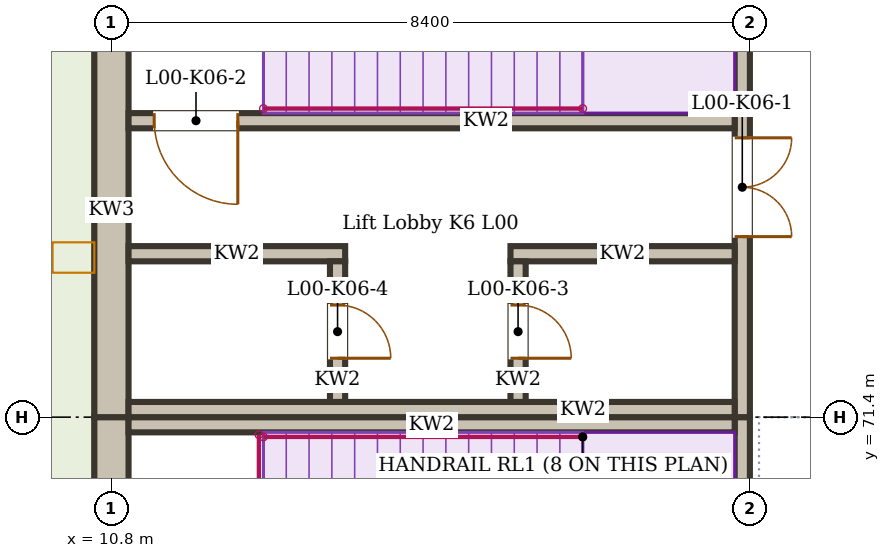
"""IFC4 building model, lengths in metres.
Left out: names, types, materials, properties, quantities, classifications, styles, units other than length and angle.
Written with IfcOpenShell. Run it as: python <this file> out.ifc"""

import sys

from ifc_helpers import new_model, si_unit, direction, frame, frame_2d, origin, place, context, subcontext, project, spatial, rectangle, extrude, element, fill, save


model = new_model("IFC4")
c1 = context("Model", 3, precision=1e-05, world=origin(), true_north=direction((0.0, 1.0)))
c2 = subcontext(c1, "Body", "Model", "MODEL_VIEW")
j1 = project(units=[si_unit("LENGTHUNIT", "METRE"), si_unit("PLANEANGLEUNIT", "RADIAN")], contexts=[c1])
p1 = place(None, origin())
s1 = spatial("IfcSite", under=j1, at=p1, CompositionType="ELEMENT")
p2 = place(p1, origin())
s2 = spatial("IfcBuilding", under=s1, at=p2, CompositionType="ELEMENT")
p3 = place(p2, origin())
s3 = spatial("IfcBuildingStorey", under=s2, at=p3, CompositionType="ELEMENT", Elevation=0.0)
p4 = place(p3, frame((19.1, 71.4, 0.0), z_axis=(0.0, 0.0, 1.0), x_axis=(0.0, -1.0, 0.0)))
e1 = element("IfcWall", 1, at=p4, inside=s3, PredefinedType="SOLIDWALL", context=c2, shape_type="SweptSolid", body=[
    extrude(rectangle(XDim=8.4, YDim=0.2, at=frame_2d((4.2, 0.0))), origin(), (0.0, 0.0, 1.0), 4.5),
])
p5 = place(p4, frame((4.725, 0.0, 0.0)))
e2 = element("IfcOpeningElement", 2, at=p5, cuts=e1, PredefinedType="OPENING", context=c2, shape_type="SweptSolid", body=[
    extrude(rectangle(XDim=1.3, YDim=2.1, at=frame_2d((0.65, 1.05))), frame((0.0, 0.11, 0.0), z_axis=(0.0, -1.0, 0.0), x_axis=(1.0, 0.0, 0.0)), (0.0, 0.0, 1.0), 0.22),
])
p6 = place(p3, frame((10.8, 71.4, 0.0), z_axis=(0.0, 0.0, 1.0), x_axis=(0.0, -1.0, 0.0)))
e3 = element("IfcWall", 3, at=p6, inside=s3, PredefinedType="SOLIDWALL", context=c2, shape_type="SweptSolid", body=[
    extrude(rectangle(XDim=8.4, YDim=0.45, at=frame_2d((4.2, 0.0))), origin(), (0.0, 0.0, 1.0), 4.5),
])
p7 = place(p6, frame((1.65, 0.0, 0.0)))
e4 = element("IfcOpeningElement", 4, at=p7, cuts=e3, PredefinedType="OPENING", context=c2, shape_type="SweptSolid", body=[
    extrude(rectangle(XDim=1.3, YDim=2.1, at=frame_2d((0.65, 1.05))), frame((0.0, 0.235, 0.0), z_axis=(0.0, -1.0, 0.0), x_axis=(1.0, 0.0, 0.0)), (0.0, 0.0, 1.0), 0.47),
])
p8 = place(p3, frame((19.0, 71.3, 0.0), z_axis=(0.0, 0.0, 1.0), x_axis=(-1.0, 0.0, 0.0)))
e5 = element("IfcWall", 5, at=p8, inside=s3, PredefinedType="SOLIDWALL", context=c2, shape_type="SweptSolid", body=[
    extrude(rectangle(XDim=7.975, YDim=0.2, at=frame_2d((3.988, 0.0))), origin(), (0.0, 0.0, 1.0), 4.5),
])
p9 = place(p3, frame((19.1, 79.8, 0.0), z_axis=(0.0, 0.0, 1.0), x_axis=(0.0, -1.0, 0.0)))
e6 = element("IfcWall", 6, at=p9, inside=s3, PredefinedType="SOLIDWALL", context=c2, shape_type="SweptSolid", body=[
    extrude(rectangle(XDim=8.4, YDim=0.2, at=frame_2d((4.2, 0.0))), origin(), (0.0, 0.0, 1.0), 4.5),
])
p10 = place(p9, frame((4.725, 0.0, 0.0)))
e7 = element("IfcOpeningElement", 7, at=p10, cuts=e6, PredefinedType="OPENING", context=c2, shape_type="SweptSolid", body=[
    extrude(rectangle(XDim=1.3, YDim=2.1, at=frame_2d((0.65, 1.05))), frame((0.0, 0.11, 0.0), z_axis=(0.0, -1.0, 0.0), x_axis=(1.0, 0.0, 0.0)), (0.0, 0.0, 1.0), 0.22),
])
p11 = place(p3, frame((10.8, 79.8, 0.0), z_axis=(0.0, 0.0, 1.0), x_axis=(0.0, -1.0, 0.0)))
e8 = element("IfcWall", 8, at=p11, inside=s3, PredefinedType="SOLIDWALL", context=c2, shape_type="SweptSolid", body=[
    extrude(rectangle(XDim=8.4, YDim=0.45, at=frame_2d((4.2, 0.0))), origin(), (0.0, 0.0, 1.0), 4.5),
])
p12 = place(p11, frame((1.65, 0.0, 0.0)))
e9 = element("IfcOpeningElement", 9, at=p12, cuts=e8, PredefinedType="OPENING", context=c2, shape_type="SweptSolid", body=[
    extrude(rectangle(XDim=1.3, YDim=2.1, at=frame_2d((0.65, 1.05))), frame((0.0, 0.235, 0.0), z_axis=(0.0, -1.0, 0.0), x_axis=(1.0, 0.0, 0.0)), (0.0, 0.0, 1.0), 0.47),
])
p13 = place(p3, frame((19.0, 71.5, 0.0), z_axis=(0.0, 0.0, 1.0), x_axis=(-1.0, 0.0, 0.0)))
e10 = element("IfcWall", 10, at=p13, inside=s3, PredefinedType="SOLIDWALL", context=c2, shape_type="SweptSolid", body=[
    extrude(rectangle(XDim=7.975, YDim=0.2, at=frame_2d((3.988, 0.0))), origin(), (0.0, 0.0, 1.0), 4.5),
])
p14 = place(p3, frame((19.0, 75.3, 0.0), z_axis=(0.0, 0.0, 1.0), x_axis=(-1.0, 0.0, 0.0)))
e11 = element("IfcWall", 11, at=p14, inside=s3, PredefinedType="SOLIDWALL", context=c2, shape_type="SweptSolid", body=[
    extrude(rectangle(XDim=7.975, YDim=0.2, at=frame_2d((3.988, 0.0))), origin(), (0.0, 0.0, 1.0), 4.5),
])
p15 = place(p14, frame((6.538, 0.0, 0.0)))
e12 = element("IfcOpeningElement", 12, at=p15, cuts=e11, PredefinedType="OPENING", context=c2, shape_type="SweptSolid", body=[
    extrude(rectangle(XDim=1.1, YDim=2.1, at=frame_2d((0.55, 1.05))), frame((0.0, 0.11, 0.0), z_axis=(0.0, -1.0, 0.0), x_axis=(1.0, 0.0, 0.0)), (0.0, 0.0, 1.0), 0.22),
])
p16 = place(p3, frame((19.0, 73.55, 0.0), z_axis=(0.0, 0.0, 1.0), x_axis=(-1.0, 0.0, 0.0)))
e13 = element("IfcWall", 13, at=p16, inside=s3, PredefinedType="SOLIDWALL", context=c2, shape_type="SweptSolid", body=[
    extrude(rectangle(XDim=2.95, YDim=0.2, at=frame_2d((1.475, 0.0))), origin(), (0.0, 0.0, 1.0), 4.35),
])
p17 = place(p3, frame((13.875, 73.55, 0.0), z_axis=(0.0, 0.0, 1.0), x_axis=(-1.0, 0.0, 0.0)))
e14 = element("IfcWall", 14, at=p17, inside=s3, PredefinedType="SOLIDWALL", context=c2, shape_type="SweptSolid", body=[
    extrude(rectangle(XDim=2.85, YDim=0.2, at=frame_2d((1.425, 0.0))), origin(), (0.0, 0.0, 1.0), 4.35),
])
p18 = place(p3, frame((16.15, 73.45, 0.0), z_axis=(0.0, 0.0, 1.0), x_axis=(0.0, -1.0, 0.0)))
e15 = element("IfcWall", 15, at=p18, inside=s3, PredefinedType="SOLIDWALL", context=c2, shape_type="SweptSolid", body=[
    extrude(rectangle(XDim=1.85, YDim=0.2, at=frame_2d((0.925, 0.0))), origin(), (0.0, 0.0, 1.0), 4.35),
])
p19 = place(p18, frame((0.575, 0.0, 0.0)))
e16 = element("IfcOpeningElement", 16, at=p19, cuts=e15, PredefinedType="OPENING", context=c2, shape_type="SweptSolid", body=[
    extrude(rectangle(XDim=0.7, YDim=2.1, at=frame_2d((0.35, 1.05))), frame((0.0, 0.11, 0.0), z_axis=(0.0, -1.0, 0.0), x_axis=(1.0, 0.0, 0.0)), (0.0, 0.0, 1.0), 0.22),
])
p20 = place(p3, frame((13.775, 73.45, 0.0), z_axis=(0.0, 0.0, 1.0), x_axis=(0.0, -1.0, 0.0)))
e17 = element("IfcWall", 17, at=p20, inside=s3, PredefinedType="SOLIDWALL", context=c2, shape_type="SweptSolid", body=[
    extrude(rectangle(XDim=1.85, YDim=0.2, at=frame_2d((0.925, 0.0))), origin(), (0.0, 0.0, 1.0), 4.35),
])
p21 = place(p20, frame((0.575, 0.0, 0.0)))
e18 = element("IfcOpeningElement", 18, at=p21, cuts=e17, PredefinedType="OPENING", context=c2, shape_type="SweptSolid", body=[
    extrude(rectangle(XDim=0.7, YDim=2.1, at=frame_2d((0.35, 1.05))), frame((0.0, 0.11, 0.0), z_axis=(0.0, -1.0, 0.0), x_axis=(1.0, 0.0, 0.0)), (0.0, 0.0, 1.0), 0.22),
])
p22 = place(p10, origin())
e19 = element("IfcDoor", 19, at=p22, inside=s3, OperationType="DOUBLE_DOOR_DOUBLE_SWING", PredefinedType="DOOR", context=c2, shape_type="SweptSolid", body=[
    extrude(rectangle(XDim=1.3, YDim=2.1, at=frame_2d((0.65, 1.05))), frame((0.0, 0.025, 0.0), z_axis=(0.0, -1.0, 0.0), x_axis=(1.0, 0.0, 0.0)), (0.0, 0.0, 1.0), 0.05),
])
fill(e7, e19)
p23 = place(p15, origin())
e20 = element("IfcDoor", 20, at=p23, inside=s3, OperationType="SINGLE_SWING_LEFT", PredefinedType="DOOR", context=c2, shape_type="SweptSolid", body=[
    extrude(rectangle(XDim=1.1, YDim=2.1, at=frame_2d((0.55, 1.05))), frame((0.0, 0.025, 0.0), z_axis=(0.0, -1.0, 0.0), x_axis=(1.0, 0.0, 0.0)), (0.0, 0.0, 1.0), 0.05),
])
fill(e12, e20)
p24 = place(p19, origin())
e21 = element("IfcDoor", 21, at=p24, inside=s3, OperationType="SINGLE_SWING_RIGHT", PredefinedType="DOOR", context=c2, shape_type="SweptSolid", body=[
    extrude(rectangle(XDim=0.7, YDim=2.1, at=frame_2d((0.35, 1.05))), frame((0.0, 0.025, 0.0), z_axis=(0.0, -1.0, 0.0), x_axis=(1.0, 0.0, 0.0)), (0.0, 0.0, 1.0), 0.05),
])
fill(e16, e21)
p25 = place(p21, origin())
e22 = element("IfcDoor", 22, at=p25, inside=s3, OperationType="SINGLE_SWING_RIGHT", PredefinedType="DOOR", context=c2, shape_type="SweptSolid", body=[
    extrude(rectangle(XDim=0.7, YDim=2.1, at=frame_2d((0.35, 1.05))), frame((0.0, 0.025, 0.0), z_axis=(0.0, -1.0, 0.0), x_axis=(1.0, 0.0, 0.0)), (0.0, 0.0, 1.0), 0.05),
])
fill(e18, e22)
save(model, sys.argv[1])
